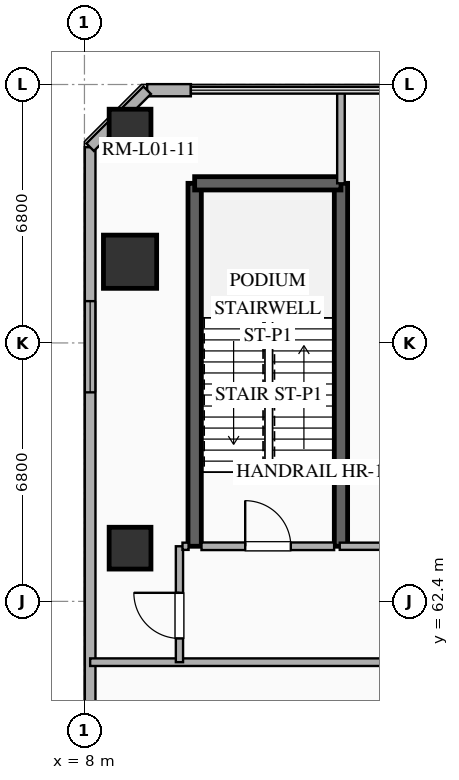
"""IFC4 building model, lengths in metres.
Left out: names, types, materials, properties, quantities, classifications, styles, units other than length and angle.
Written with IfcOpenShell. Run it as: python <this file> out.ifc"""

import sys

from ifc_helpers import new_model, si_unit, direction, frame, frame_2d, origin, origin_2d, place, context, subcontext, project, spatial, rectangle, extrude, element, fill, save


model = new_model("IFC4")
c1 = context("Model", 3, precision=1e-05, world=origin(), true_north=direction((0.0, 1.0)))
c2 = subcontext(c1, "Body", "Model", "MODEL_VIEW")
j1 = project(units=[si_unit("LENGTHUNIT", "METRE"), si_unit("PLANEANGLEUNIT", "RADIAN")], contexts=[c1])
p1 = place(None, origin())
s1 = spatial("IfcSite", under=j1, at=p1, CompositionType="ELEMENT")
p2 = place(p1, origin())
s2 = spatial("IfcBuilding", under=s1, at=p2, CompositionType="ELEMENT")
p3 = place(p2, frame((0.0, 0.0, 6.0)))
s3 = spatial("IfcBuildingStorey", under=s2, at=p3, CompositionType="ELEMENT", Elevation=6.0)
for number, where, z_axis, x_axis in (
    (1, (9.2, 74.8, 0.0), (0.0, 0.0, 1.0), (1.0, 0.0, 0.0)),
    (2, (9.2, 63.8, 0.0), (0.0, 0.0, 1.0), (1.0, 0.0, 0.0)),
):
    element("IfcColumn", number, at=place(p3, frame(where, z_axis=z_axis, x_axis=x_axis)), inside=s3, PredefinedType="COLUMN", context=c2, shape_type="SweptSolid", body=[
        extrude(rectangle(XDim=1.1, YDim=1.1, at=origin_2d()), origin(), (0.0, 0.0, 1.0), 5.12),
    ])
p4 = place(p3, frame((9.2, 71.337, 0.0), z_axis=(0.0, 0.0, 1.0), x_axis=(1.0, 0.0, 0.0)))
e3 = element("IfcColumn", 3, at=p4, inside=s3, PredefinedType="COLUMN", context=c2, shape_type="SweptSolid", body=[
    extrude(rectangle(XDim=1.4, YDim=1.4, at=origin_2d()), origin(), (0.0, 0.0, 1.0), 5.12),
])
for number, where, z_axis, x_axis in (
    (4, (10.9, 63.85, 0.0), (0.0, 0.0, 1.0), (0.0, 1.0, 0.0)),
    (5, (14.75, 63.85, 0.0), (0.0, 0.0, 1.0), (0.0, 1.0, 0.0)),
):
    element("IfcWall", number, at=place(p3, frame(where, z_axis=z_axis, x_axis=x_axis)), inside=s3, PredefinedType="SHEAR", context=c2, shape_type="SweptSolid", body=[
        extrude(rectangle(XDim=9.55, YDim=0.35, at=frame_2d((4.775, 0.0))), origin(), (0.0, 0.0, 1.0), 5.12),
    ])
p5 = place(p3, frame((10.9, 73.4, 0.0), z_axis=(0.0, 0.0, 1.0), x_axis=(1.0, 0.0, 0.0)))
e6 = element("IfcWall", 6, at=p5, inside=s3, PredefinedType="SHEAR", context=c2, shape_type="SweptSolid", body=[
    extrude(rectangle(XDim=3.85, YDim=0.35, at=frame_2d((1.925, 0.0))), origin(), (0.0, 0.0, 1.0), 5.12),
])
p6 = place(p3, frame((10.8, 75.85, 0.0), z_axis=(0.0, 0.0, 1.0), x_axis=(-1.0, 0.0, 0.0)))
e7 = element("IfcWall", 7, at=p6, inside=s3, PredefinedType="SOLIDWALL", context=c2, shape_type="SweptSolid", body=[
    extrude(rectangle(XDim=1.15, YDim=0.32, at=frame_2d((0.575, 0.0))), origin(), (0.0, 0.0, 1.0), 5.12),
])
p7 = place(p3, frame((8.15, 33.0, 0.0), z_axis=(0.0, 0.0, 1.0), x_axis=(0.0, 1.0, 0.0)))
e8 = element("IfcWall", 8, at=p7, inside=s3, PredefinedType="SOLIDWALL", context=c2, shape_type="SweptSolid", body=[
    extrude(rectangle(XDim=41.35, YDim=0.28, at=frame_2d((20.675, 0.0))), origin(), (0.0, 0.0, 1.0), 5.12),
])
p8 = place(p7, frame((6.425, 0.0, 0.9)))
e9 = element("IfcOpeningElement", 9, at=p8, cuts=e8, PredefinedType="OPENING", context=c2, shape_type="SweptSolid", body=[
    extrude(rectangle(XDim=2.4, YDim=2.6, at=frame_2d((1.2, 1.3))), frame((0.0, 0.15, 0.0), z_axis=(0.0, -1.0, 0.0), x_axis=(1.0, 0.0, 0.0)), (0.0, 0.0, 1.0), 0.3),
])
p9 = place(p7, frame((21.225, 0.0, 0.9)))
e10 = element("IfcOpeningElement", 10, at=p9, cuts=e8, PredefinedType="OPENING", context=c2, shape_type="SweptSolid", body=[
    extrude(rectangle(XDim=2.4, YDim=2.6, at=frame_2d((1.2, 1.3))), frame((0.0, 0.15, 0.0), z_axis=(0.0, -1.0, 0.0), x_axis=(1.0, 0.0, 0.0)), (0.0, 0.0, 1.0), 0.3),
])
p10 = place(p7, frame((34.9, 0.0, 0.9)))
e11 = element("IfcOpeningElement", 11, at=p10, cuts=e8, PredefinedType="OPENING", context=c2, shape_type="SweptSolid", body=[
    extrude(rectangle(XDim=2.4, YDim=2.6, at=frame_2d((1.2, 1.3))), frame((0.0, 0.15, 0.0), z_axis=(0.0, -1.0, 0.0), x_axis=(1.0, 0.0, 0.0)), (0.0, 0.0, 1.0), 0.3),
])
p11 = place(p3, frame((9.65, 75.85, 0.0), z_axis=(0.0, 0.0, 1.0), x_axis=(-0.707106781187, -0.707106781187, 0.0)))
e12 = element("IfcWall", 12, at=p11, inside=s3, PredefinedType="SOLIDWALL", context=c2, shape_type="SweptSolid", body=[
    extrude(rectangle(XDim=2.121, YDim=0.28, at=frame_2d((1.061, 0.0))), origin(), (0.0, 0.0, 1.0), 5.12),
])
p12 = place(p3, frame((11.08, 63.85, 0.0), z_axis=(0.0, 0.0, 1.0), x_axis=(1.0, 0.0, 0.0)))
e13 = element("IfcWall", 13, at=p12, inside=s3, PredefinedType="SOLIDWALL", context=c2, shape_type="SweptSolid", body=[
    extrude(rectangle(XDim=3.49, YDim=0.2, at=frame_2d((1.745, 0.0))), origin(), (0.0, 0.0, 1.0), 4.32),
])
p13 = place(p12, frame((1.15, 0.0, 0.0)))
e14 = element("IfcOpeningElement", 14, at=p13, cuts=e13, PredefinedType="OPENING", context=c2, shape_type="SweptSolid", body=[
    extrude(rectangle(XDim=1.2, YDim=2.15, at=frame_2d((0.6, 1.075))), frame((0.0, 0.11, 0.0), z_axis=(0.0, -1.0, 0.0), x_axis=(1.0, 0.0, 0.0)), (0.0, 0.0, 1.0), 0.22),
])
p14 = place(p3, frame((34.0, 60.8, 0.0), z_axis=(0.0, 0.0, 1.0), x_axis=(-1.0, 0.0, 0.0)))
e15 = element("IfcWall", 15, at=p14, inside=s3, PredefinedType="PARTITIONING", context=c2, shape_type="SweptSolid", body=[
    extrude(rectangle(XDim=25.85, YDim=0.2, at=frame_2d((12.925, 0.0))), origin(), (0.0, 0.0, 1.0), 4.32),
])
p15 = place(p14, frame((11.15, 0.0, 0.0)))
e16 = element("IfcOpeningElement", 16, at=p15, cuts=e15, PredefinedType="OPENING", context=c2, shape_type="SweptSolid", body=[
    extrude(rectangle(XDim=1.2, YDim=2.25, at=frame_2d((0.6, 1.125))), frame((0.0, 0.11, 0.0), z_axis=(0.0, -1.0, 0.0), x_axis=(1.0, 0.0, 0.0)), (0.0, 0.0, 1.0), 0.22),
])
p16 = place(p3, frame((14.718, 63.85, 0.0), z_axis=(0.0, 0.0, 1.0), x_axis=(1.0, 0.0, 0.0)))
e17 = element("IfcWall", 17, at=p16, inside=s3, PredefinedType="PARTITIONING", context=c2, shape_type="SweptSolid", body=[
    extrude(rectangle(XDim=6.714, YDim=0.19, at=frame_2d((3.357, 0.0))), origin(), (0.0, 0.0, 1.0), 4.32),
])
p17 = place(p16, frame((2.457, 0.0, 0.0)))
e18 = element("IfcOpeningElement", 18, at=p17, cuts=e17, PredefinedType="OPENING", context=c2, shape_type="SweptSolid", body=[
    extrude(rectangle(XDim=1.2, YDim=2.25, at=frame_2d((0.6, 1.125))), frame((0.0, 0.105, 0.0), z_axis=(0.0, -1.0, 0.0), x_axis=(1.0, 0.0, 0.0)), (0.0, 0.0, 1.0), 0.21),
])
p18 = place(p3, frame((10.5, 60.8, 0.0), z_axis=(0.0, 0.0, 1.0), x_axis=(0.0, 1.0, 0.0)))
e19 = element("IfcWall", 19, at=p18, inside=s3, PredefinedType="PARTITIONING", context=c2, shape_type="SweptSolid", body=[
    extrude(rectangle(XDim=3.05, YDim=0.19, at=frame_2d((1.525, 0.0))), origin(), (0.0, 0.0, 1.0), 4.32),
])
p19 = place(p18, frame((0.625, 0.0, 0.0)))
e20 = element("IfcOpeningElement", 20, at=p19, cuts=e19, PredefinedType="OPENING", context=c2, shape_type="SweptSolid", body=[
    extrude(rectangle(XDim=1.2, YDim=2.25, at=frame_2d((0.6, 1.125))), frame((0.0, 0.105, 0.0), z_axis=(0.0, -1.0, 0.0), x_axis=(1.0, 0.0, 0.0)), (0.0, 0.0, 1.0), 0.21),
])
p20 = place(p3, frame((14.75, 75.85, 0.0), z_axis=(0.0, 0.0, 1.0), x_axis=(0.0, -1.0, 0.0)))
e21 = element("IfcWall", 21, at=p20, inside=s3, PredefinedType="PARTITIONING", context=c2, shape_type="SweptSolid", body=[
    extrude(rectangle(XDim=2.45, YDim=0.2, at=frame_2d((1.225, 0.0))), origin(), (0.0, 0.0, 1.0), 4.32),
])
p21 = place(p3, frame((10.58, 63.85, 0.0), z_axis=(0.0, 0.0, 1.0), x_axis=(1.0, 0.0, 0.0)))
e22 = element("IfcWall", 22, at=p21, inside=s3, PredefinedType="PARTITIONING", context=c2, shape_type="SweptSolid", body=[
    extrude(rectangle(XDim=0.16, YDim=0.19, at=frame_2d((0.08, 0.0))), origin(), (0.0, 0.0, 1.0), 4.32),
])
p22 = place(p10, origin())
e23 = element("IfcWindow", 23, at=p22, inside=s3, PartitioningType="SINGLE_PANEL", PredefinedType="WINDOW", context=c2, shape_type="SweptSolid", body=[
    extrude(rectangle(XDim=2.4, YDim=2.6, at=frame_2d((1.2, 1.3))), frame((0.0, 0.03, 0.0), z_axis=(0.0, -1.0, 0.0), x_axis=(1.0, 0.0, 0.0)), (0.0, 0.0, 1.0), 0.06),
])
fill(e11, e23)
p23 = place(p13, origin())
e24 = element("IfcDoor", 24, at=p23, inside=s3, OperationType="SINGLE_SWING_LEFT", PredefinedType="DOOR", context=c2, shape_type="SweptSolid", body=[
    extrude(rectangle(XDim=1.2, YDim=2.15, at=frame_2d((0.6, 1.075))), frame((0.0, 0.025, 0.0), z_axis=(0.0, -1.0, 0.0), x_axis=(1.0, 0.0, 0.0)), (0.0, 0.0, 1.0), 0.05),
])
fill(e14, e24)
p24 = place(p19, origin())
e25 = element("IfcDoor", 25, at=p24, inside=s3, OperationType="SINGLE_SWING_RIGHT", PredefinedType="DOOR", context=c2, shape_type="SweptSolid", body=[
    extrude(rectangle(XDim=1.2, YDim=2.25, at=frame_2d((0.6, 1.125))), frame((0.0, 0.025, 0.0), z_axis=(0.0, -1.0, 0.0), x_axis=(1.0, 0.0, 0.0)), (0.0, 0.0, 1.0), 0.05),
])
fill(e20, e25)
save(model, sys.argv[1])
